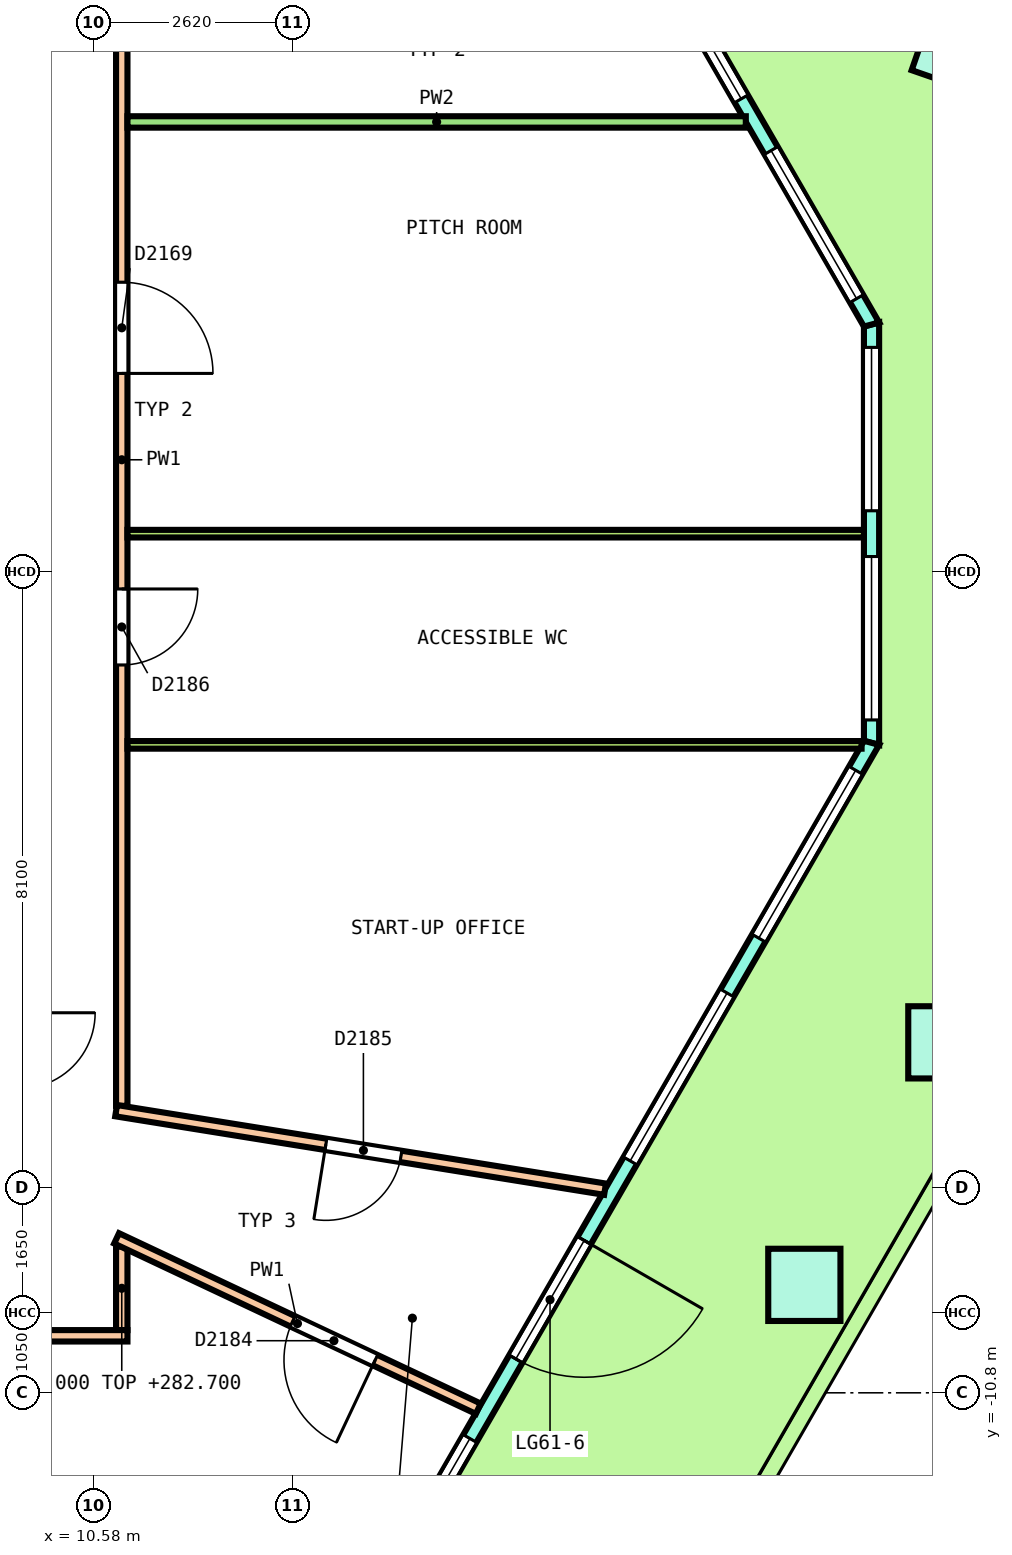
"""IFC4 building model, lengths in metres.
Left out: names, types, materials, properties, quantities, classifications, styles, units other than length and angle.
Written with IfcOpenShell. Run it as: python <this file> out.ifc"""

import sys

from ifc_helpers import new_model, si_unit, direction, frame, frame_2d, origin, origin_2d, place, context, subcontext, project, spatial, polyline, rectangle, outline, extrude, element, fill, save


model = new_model("IFC4")
c1 = context("Model", 3, precision=1e-05, world=origin(), true_north=direction((0.0, 1.0)))
c2 = subcontext(c1, "Body", "Model", "MODEL_VIEW")
j1 = project(units=[si_unit("LENGTHUNIT", "METRE"), si_unit("PLANEANGLEUNIT", "RADIAN")], contexts=[c1])
p1 = place(None, origin())
s1 = spatial("IfcSite", under=j1, at=p1, CompositionType="ELEMENT")
p2 = place(p1, origin())
s2 = spatial("IfcBuilding", under=s1, at=p2, CompositionType="ELEMENT")
p3 = place(p2, frame((0.0, 0.0, 279.0)))
s3 = spatial("IfcBuildingStorey", under=s2, at=p3, CompositionType="ELEMENT", Elevation=279.0)
p4 = place(p3, frame((21.946, 6.893, 0.0), z_axis=(0.021793949015, 0.025136579231, 0.999446434868), x_axis=(-0.499172624886, 0.866433923407, -0.010906279564)))
e1 = element("IfcColumn", 1, at=p4, inside=s3, PredefinedType="COLUMN", context=c2, shape_type="SweptSolid", body=[
    extrude(rectangle(XDim=0.95, YDim=0.95, at=origin_2d()), origin(), (0.0, 0.0, 1.0), 3.652),
])
p5 = place(p3, frame((19.93, -9.38, 0.0), z_axis=(0.003611945175, 0.00628746012, 0.999973710503), x_axis=(0.497890394796, 0.867209649664, -0.007251089524)))
e2 = element("IfcColumn", 2, at=p5, inside=s3, PredefinedType="COLUMN", context=c2, shape_type="SweptSolid", body=[
    extrude(rectangle(XDim=0.95, YDim=0.95, at=origin_2d()), origin(), (0.0, 0.0, 1.0), 3.65),
])
p6 = place(p3, frame((21.772, -6.189, 0.0), z_axis=(0.010900423214, 0.018858400897, 0.999762742599), x_axis=(0.500590318805, 0.865410234662, -0.021782067434)))
e3 = element("IfcColumn", 3, at=p6, inside=s3, PredefinedType="COLUMN", context=c2, shape_type="SweptSolid", body=[
    extrude(rectangle(XDim=0.95, YDim=0.95, at=origin_2d()), origin(), (0.0, 0.0, 1.0), 3.651),
])
p7 = place(p3, frame((20.814, -2.249, 0.0), z_axis=(0.0, 0.0, 1.0), x_axis=(0.0, 1.0, 0.0)))
e4 = element("IfcWall", 4, at=p7, inside=s3, PredefinedType="SOLIDWALL", context=c2, shape_type="SweptSolid", body=[
    extrude(outline(polyline([(-0.027, -0.1), (1.084, -0.1), (2.196, -0.1), (3.307, -0.1), (4.419, -0.1), (5.53, -0.1), (5.476, 0.1), (4.386, 0.1), (3.297, 0.1), (2.207, 0.1), (1.117, 0.1), (0.027, 0.1), (-0.027, -0.1)])), origin(), (0.0, 0.0, 1.0), 3.7),
])
p8 = place(p7, frame((0.301, 0.0, 0.1)))
e5 = element("IfcOpeningElement", 5, at=p8, cuts=e4, PredefinedType="OPENING", context=c2, shape_type="SweptSolid", body=[
    extrude(rectangle(XDim=2.15, YDim=2.75, at=frame_2d((1.075, 1.375))), frame((0.0, 0.11, 0.0), z_axis=(0.0, -1.0, 0.0), x_axis=(1.0, 0.0, 0.0)), (0.0, 0.0, 1.0), 0.22),
])
p9 = place(p7, frame((3.052, 0.0, 0.1)))
e6 = element("IfcOpeningElement", 6, at=p9, cuts=e4, PredefinedType="OPENING", context=c2, shape_type="SweptSolid", body=[
    extrude(rectangle(XDim=2.15, YDim=2.75, at=frame_2d((1.075, 1.375))), frame((0.0, 0.11, 0.0), z_axis=(0.0, -1.0, 0.0), x_axis=(1.0, 0.0, 0.0)), (0.0, 0.0, 1.0), 0.22),
])
p10 = place(p3, frame((20.814, 3.254, 0.0), z_axis=(0.0, 0.0, 1.0), x_axis=(-0.50000233518, 0.866024055563, 0.0)))
e7 = element("IfcWall", 7, at=p10, inside=s3, PredefinedType="SOLIDWALL", context=c2, shape_type="SweptSolid", body=[
    extrude(outline(polyline([(-0.027, -0.1), (0.989, -0.1), (2.004, -0.1), (3.019, -0.1), (4.035, -0.1), (5.05, -0.1), (6.065, -0.1), (7.081, -0.1), (8.096, -0.1), (9.112, -0.1), (10.127, -0.1), (11.143, -0.1), (12.158, -0.1), (13.173, -0.1), (14.189, -0.1), (15.204, -0.1), (15.15, 0.1), (14.142, 0.1), (13.134, 0.1), (12.126, 0.1), (11.117, 0.1), (10.109, 0.1), (9.101, 0.1), (8.093, 0.1), (7.084, 0.1), (6.076, 0.1), (5.068, 0.1), (4.06, 0.1), (3.052, 0.1), (2.043, 0.1), (1.035, 0.1), (0.027, 0.1), (-0.027, -0.1)])), origin(), (0.0, 0.0, 1.0), 3.7),
])
p11 = place(p10, frame((0.393, 0.0, 0.1)))
e8 = element("IfcOpeningElement", 8, at=p11, cuts=e7, PredefinedType="OPENING", context=c2, shape_type="SweptSolid", body=[
    extrude(rectangle(XDim=2.25, YDim=2.75, at=frame_2d((1.125, 1.375))), frame((0.0, 0.11, 0.0), z_axis=(0.0, -1.0, 0.0), x_axis=(1.0, 0.0, 0.0)), (0.0, 0.0, 1.0), 0.22),
])
p12 = place(p10, frame((3.428, 0.0, 0.1)))
e9 = element("IfcOpeningElement", 9, at=p12, cuts=e7, PredefinedType="OPENING", context=c2, shape_type="SweptSolid", body=[
    extrude(rectangle(XDim=2.25, YDim=2.75, at=frame_2d((1.125, 1.375))), frame((0.0, 0.11, 0.0), z_axis=(0.0, -1.0, 0.0), x_axis=(1.0, 0.0, 0.0)), (0.0, 0.0, 1.0), 0.22),
])
p13 = place(p10, frame((6.689, 0.0, 0.0)))
e10 = element("IfcOpeningElement", 10, at=p13, cuts=e7, PredefinedType="OPENING", context=c2, shape_type="SweptSolid", body=[
    extrude(rectangle(XDim=1.8, YDim=2.4, at=frame_2d((0.9, 1.2))), frame((0.0, 0.11, 0.0), z_axis=(0.0, -1.0, 0.0), x_axis=(1.0, 0.0, 0.0)), (0.0, 0.0, 1.0), 0.22),
])
p14 = place(p10, frame((6.689, 0.0, 2.55)))
e11 = element("IfcOpeningElement", 11, at=p14, cuts=e7, PredefinedType="OPENING", context=c2, shape_type="SweptSolid", body=[
    extrude(rectangle(XDim=1.8, YDim=0.3, at=frame_2d((0.9, 0.15))), frame((0.0, 0.11, 0.0), z_axis=(0.0, -1.0, 0.0), x_axis=(1.0, 0.0, 0.0)), (0.0, 0.0, 1.0), 0.22),
])
p15 = place(p10, frame((9.499, 0.0, 0.1)))
e12 = element("IfcOpeningElement", 12, at=p15, cuts=e7, PredefinedType="OPENING", context=c2, shape_type="SweptSolid", body=[
    extrude(rectangle(XDim=2.25, YDim=2.75, at=frame_2d((1.125, 1.375))), frame((0.0, 0.11, 0.0), z_axis=(0.0, -1.0, 0.0), x_axis=(1.0, 0.0, 0.0)), (0.0, 0.0, 1.0), 0.22),
])
p16 = place(p10, frame((12.534, 0.0, 0.1)))
e13 = element("IfcOpeningElement", 13, at=p16, cuts=e7, PredefinedType="OPENING", context=c2, shape_type="SweptSolid", body=[
    extrude(rectangle(XDim=2.25, YDim=2.75, at=frame_2d((1.125, 1.375))), frame((0.0, 0.11, 0.0), z_axis=(0.0, -1.0, 0.0), x_axis=(1.0, 0.0, 0.0)), (0.0, 0.0, 1.0), 0.22),
])
p17 = place(p3, frame((12.355, -16.901, 0.0), z_axis=(0.0, 0.0, 1.0), x_axis=(0.499997253739, 0.866026989333, 0.0)))
e14 = element("IfcWall", 14, at=p17, inside=s3, PredefinedType="SOLIDWALL", context=c2, shape_type="SweptSolid", body=[
    extrude(outline(polyline([(-0.027, -0.1), (1.034, -0.1), (2.095, -0.1), (3.156, -0.1), (4.216, -0.1), (5.277, -0.1), (6.338, -0.1), (7.399, -0.1), (8.459, -0.1), (9.52, -0.1), (10.581, -0.1), (11.642, -0.1), (12.703, -0.1), (13.763, -0.1), (14.824, -0.1), (15.885, -0.1), (16.946, -0.1), (16.892, 0.1), (15.838, 0.1), (14.784, 0.1), (13.73, 0.1), (12.676, 0.1), (11.622, 0.1), (10.568, 0.1), (9.514, 0.1), (8.459, 0.1), (7.405, 0.1), (6.351, 0.1), (5.297, 0.1), (4.243, 0.1), (3.189, 0.1), (2.135, 0.1), (1.081, 0.1), (0.027, 0.1), (-0.027, -0.1)])), origin(), (0.0, 0.0, 1.0), 3.7),
])
p18 = place(p17, frame((0.417, 0.0, 0.1)))
e15 = element("IfcOpeningElement", 15, at=p18, cuts=e14, PredefinedType="OPENING", context=c2, shape_type="SweptSolid", body=[
    extrude(rectangle(XDim=2.55, YDim=2.75, at=frame_2d((1.275, 1.375))), frame((0.0, 0.11, 0.0), z_axis=(0.0, -1.0, 0.0), x_axis=(1.0, 0.0, 0.0)), (0.0, 0.0, 1.0), 0.22),
])
p19 = place(p17, frame((3.801, 0.0, 0.1)))
e16 = element("IfcOpeningElement", 16, at=p19, cuts=e14, PredefinedType="OPENING", context=c2, shape_type="SweptSolid", body=[
    extrude(rectangle(XDim=2.55, YDim=2.75, at=frame_2d((1.275, 1.375))), frame((0.0, 0.11, 0.0), z_axis=(0.0, -1.0, 0.0), x_axis=(1.0, 0.0, 0.0)), (0.0, 0.0, 1.0), 0.22),
])
p20 = place(p17, frame((7.56, 0.0, 0.0)))
e17 = element("IfcOpeningElement", 17, at=p20, cuts=e14, PredefinedType="OPENING", context=c2, shape_type="SweptSolid", body=[
    extrude(rectangle(XDim=1.8, YDim=2.4, at=frame_2d((0.9, 1.2))), frame((0.0, 0.11, 0.0), z_axis=(0.0, -1.0, 0.0), x_axis=(1.0, 0.0, 0.0)), (0.0, 0.0, 1.0), 0.22),
])
p21 = place(p17, frame((7.56, 0.0, 2.55)))
e18 = element("IfcOpeningElement", 18, at=p21, cuts=e14, PredefinedType="OPENING", context=c2, shape_type="SweptSolid", body=[
    extrude(rectangle(XDim=1.8, YDim=0.3, at=frame_2d((0.9, 0.15))), frame((0.0, 0.11, 0.0), z_axis=(0.0, -1.0, 0.0), x_axis=(1.0, 0.0, 0.0)), (0.0, 0.0, 1.0), 0.22),
])
p22 = place(p17, frame((10.568, 0.0, 0.1)))
e19 = element("IfcOpeningElement", 19, at=p22, cuts=e14, PredefinedType="OPENING", context=c2, shape_type="SweptSolid", body=[
    extrude(rectangle(XDim=2.55, YDim=2.75, at=frame_2d((1.275, 1.375))), frame((0.0, 0.11, 0.0), z_axis=(0.0, -1.0, 0.0), x_axis=(1.0, 0.0, 0.0)), (0.0, 0.0, 1.0), 0.22),
])
p23 = place(p17, frame((13.952, 0.0, 0.1)))
e20 = element("IfcOpeningElement", 20, at=p23, cuts=e14, PredefinedType="OPENING", context=c2, shape_type="SweptSolid", body=[
    extrude(rectangle(XDim=2.55, YDim=2.75, at=frame_2d((1.275, 1.375))), frame((0.0, 0.11, 0.0), z_axis=(0.0, -1.0, 0.0), x_axis=(1.0, 0.0, 0.0)), (0.0, 0.0, 1.0), 0.22),
])
p24 = place(p3, frame((10.95, -9.975, 0.0), z_axis=(0.0, 0.0, 1.0), x_axis=(0.0, 1.0, 0.0)))
e21 = element("IfcWall", 21, at=p24, inside=s3, PredefinedType="PARTITIONING", context=c2, shape_type="SweptSolid", body=[
    extrude(rectangle(XDim=1.1, YDim=0.15, at=frame_2d((0.55, 0.0))), origin(), (0.0, 0.0, 1.0), 3.7),
])
p25 = place(p3, frame((10.95, -7.025, 0.0), z_axis=(0.0, 0.0, 1.0), x_axis=(0.0, 1.0, 0.0)))
e22 = element("IfcWall", 22, at=p25, inside=s3, PredefinedType="PARTITIONING", context=c2, shape_type="SweptSolid", body=[
    extrude(rectangle(XDim=17.0, YDim=0.15, at=frame_2d((8.5, 0.0))), origin(), (0.0, 0.0, 1.0), 2.9),
])
p26 = place(p25, frame((9.636, 0.0, 0.0)))
e23 = element("IfcOpeningElement", 23, at=p26, cuts=e22, PredefinedType="OPENING", context=c2, shape_type="SweptSolid", body=[
    extrude(rectangle(XDim=1.2, YDim=2.1, at=frame_2d((0.6, 1.05))), frame((0.0, 0.085, 0.0), z_axis=(0.0, -1.0, 0.0), x_axis=(1.0, 0.0, 0.0)), (0.0, 0.0, 1.0), 0.17),
])
p27 = place(p25, frame((14.51, 0.0, 0.0)))
e24 = element("IfcOpeningElement", 24, at=p27, cuts=e22, PredefinedType="OPENING", context=c2, shape_type="SweptSolid", body=[
    extrude(rectangle(XDim=1.0, YDim=2.1, at=frame_2d((0.5, 1.05))), frame((0.0, 0.085, 0.0), z_axis=(0.0, -1.0, 0.0), x_axis=(1.0, 0.0, 0.0)), (0.0, 0.0, 1.0), 0.17),
])
p28 = place(p25, frame((5.8, 0.0, 0.0)))
e25 = element("IfcOpeningElement", 25, at=p28, cuts=e22, PredefinedType="OPENING", context=c2, shape_type="SweptSolid", body=[
    extrude(rectangle(XDim=1.0, YDim=2.1, at=frame_2d((0.5, 1.05))), frame((0.0, 0.085, 0.0), z_axis=(0.0, -1.0, 0.0), x_axis=(1.0, 0.0, 0.0)), (0.0, 0.0, 1.0), 0.17),
])
p29 = place(p3, frame((-10.9, -10.05, 0.0), z_axis=(0.0, 0.0, 1.0), x_axis=(1.0, 0.0, 0.0)))
e26 = element("IfcWall", 26, at=p29, inside=s3, PredefinedType="PARTITIONING", context=c2, shape_type="SweptSolid", body=[
    extrude(rectangle(XDim=21.925, YDim=0.15, at=frame_2d((10.962, 0.0))), origin(), (0.0, 0.0, 1.0), 2.9),
])
p30 = place(p29, frame((2.54, 0.0, 0.0)))
e27 = element("IfcOpeningElement", 27, at=p30, cuts=e26, PredefinedType="OPENING", context=c2, shape_type="SweptSolid", body=[
    extrude(rectangle(XDim=1.2, YDim=2.1, at=frame_2d((0.6, 1.05))), frame((0.0, 0.085, 0.0), z_axis=(0.0, -1.0, 0.0), x_axis=(1.0, 0.0, 0.0)), (0.0, 0.0, 1.0), 0.17),
])
p31 = place(p29, frame((9.214, 0.0, 0.0)))
e28 = element("IfcOpeningElement", 28, at=p31, cuts=e26, PredefinedType="OPENING", context=c2, shape_type="SweptSolid", body=[
    extrude(rectangle(XDim=1.2, YDim=2.1, at=frame_2d((0.6, 1.05))), frame((0.0, 0.085, 0.0), z_axis=(0.0, -1.0, 0.0), x_axis=(1.0, 0.0, 0.0)), (0.0, 0.0, 1.0), 0.17),
])
p32 = place(p29, frame((16.694, 0.0, 0.0)))
e29 = element("IfcOpeningElement", 29, at=p32, cuts=e26, PredefinedType="OPENING", context=c2, shape_type="SweptSolid", body=[
    extrude(rectangle(XDim=1.0, YDim=2.1, at=frame_2d((0.5, 1.05))), frame((0.0, 0.085, 0.0), z_axis=(0.0, -1.0, 0.0), x_axis=(1.0, 0.0, 0.0)), (0.0, 0.0, 1.0), 0.17),
])
p33 = place(p3, frame((10.882, -8.768, 0.0), z_axis=(0.0, 0.0, 1.0), x_axis=(0.904688229147, -0.426074181386, 0.0)))
e30 = element("IfcWall", 30, at=p33, inside=s3, PredefinedType="PARTITIONING", context=c2, shape_type="SweptSolid", body=[
    extrude(rectangle(XDim=5.26, YDim=0.15, at=frame_2d((2.63, 0.0))), origin(), (0.0, 0.0, 1.0), 2.9),
])
p34 = place(p33, frame((2.56, 0.0, 0.0)))
e31 = element("IfcOpeningElement", 31, at=p34, cuts=e30, PredefinedType="OPENING", context=c2, shape_type="SweptSolid", body=[
    extrude(rectangle(XDim=1.2, YDim=2.1, at=frame_2d((0.6, 1.05))), frame((0.0, 0.085, 0.0), z_axis=(0.0, -1.0, 0.0), x_axis=(1.0, 0.0, 0.0)), (0.0, 0.0, 1.0), 0.17),
])
p35 = place(p3, frame((10.876, -7.088, 0.0), z_axis=(0.0, 0.0, 1.0), x_axis=(0.987349969018, -0.158556105777, 0.0)))
e32 = element("IfcWall", 32, at=p35, inside=s3, PredefinedType="PARTITIONING", context=c2, shape_type="SweptSolid", body=[
    extrude(rectangle(XDim=6.515, YDim=0.15, at=frame_2d((3.257, 0.0))), origin(), (0.0, 0.0, 1.0), 2.9),
])
p36 = place(p35, frame((2.795, 0.0, 0.0)))
e33 = element("IfcOpeningElement", 33, at=p36, cuts=e32, PredefinedType="OPENING", context=c2, shape_type="SweptSolid", body=[
    extrude(rectangle(XDim=1.0, YDim=2.1, at=frame_2d((0.5, 1.05))), frame((0.0, 0.085, 0.0), z_axis=(0.0, -1.0, 0.0), x_axis=(1.0, 0.0, 0.0)), (0.0, 0.0, 1.0), 0.17),
])
p37 = place(p3, frame((11.025, 5.919, 0.0), z_axis=(0.0, 0.0, 1.0), x_axis=(1.0, 0.0, 0.0)))
e34 = element("IfcWall", 34, at=p37, inside=s3, PredefinedType="PARTITIONING", context=c2, shape_type="SweptSolid", body=[
    extrude(rectangle(XDim=8.135, YDim=0.15, at=frame_2d((4.068, 0.0))), origin(), (0.0, 0.0, 1.0), 2.9),
])
p38 = place(p3, frame((11.025, 0.503, 0.0), z_axis=(0.0, 0.0, 1.0), x_axis=(1.0, 0.0, 0.0)))
e35 = element("IfcWall", 35, at=p38, inside=s3, PredefinedType="PARTITIONING", context=c2, shape_type="SweptSolid", body=[
    extrude(rectangle(XDim=9.689, YDim=0.1, at=frame_2d((4.845, 0.0))), origin(), (0.0, 0.0, 1.0), 2.9),
])
p39 = place(p3, frame((11.025, -2.276, 0.0), z_axis=(0.0, 0.0, 1.0), x_axis=(1.0, 0.0, 0.0)))
e36 = element("IfcWall", 36, at=p39, inside=s3, PredefinedType="PARTITIONING", context=c2, shape_type="SweptSolid", body=[
    extrude(rectangle(XDim=9.658, YDim=0.1, at=frame_2d((4.829, 0.0))), origin(), (0.0, 0.0, 1.0), 2.9),
])
p40 = place(p8, origin())
e37 = element("IfcWindow", 37, at=p40, inside=s3, PartitioningType="SINGLE_PANEL", PredefinedType="WINDOW", context=c2, shape_type="SweptSolid", body=[
    extrude(rectangle(XDim=2.15, YDim=2.75, at=frame_2d((1.075, 1.375))), frame((0.0, 0.03, 0.0), z_axis=(0.0, -1.0, 0.0), x_axis=(1.0, 0.0, 0.0)), (0.0, 0.0, 1.0), 0.06),
])
fill(e5, e37)
p41 = place(p9, origin())
e38 = element("IfcWindow", 38, at=p41, inside=s3, PartitioningType="SINGLE_PANEL", PredefinedType="WINDOW", context=c2, shape_type="SweptSolid", body=[
    extrude(rectangle(XDim=2.15, YDim=2.75, at=frame_2d((1.075, 1.375))), frame((0.0, 0.03, 0.0), z_axis=(0.0, -1.0, 0.0), x_axis=(1.0, 0.0, 0.0)), (0.0, 0.0, 1.0), 0.06),
])
fill(e6, e38)
p42 = place(p11, origin())
e39 = element("IfcWindow", 39, at=p42, inside=s3, PartitioningType="SINGLE_PANEL", PredefinedType="WINDOW", context=c2, shape_type="SweptSolid", body=[
    extrude(rectangle(XDim=2.25, YDim=2.75, at=frame_2d((1.125, 1.375))), frame((0.0, 0.03, 0.0), z_axis=(0.0, -1.0, 0.0), x_axis=(1.0, 0.0, 0.0)), (0.0, 0.0, 1.0), 0.06),
])
fill(e8, e39)
p43 = place(p12, origin())
e40 = element("IfcWindow", 40, at=p43, inside=s3, PartitioningType="SINGLE_PANEL", PredefinedType="WINDOW", context=c2, shape_type="SweptSolid", body=[
    extrude(rectangle(XDim=2.25, YDim=2.75, at=frame_2d((1.125, 1.375))), frame((0.0, 0.03, 0.0), z_axis=(0.0, -1.0, 0.0), x_axis=(1.0, 0.0, 0.0)), (0.0, 0.0, 1.0), 0.06),
])
fill(e9, e40)
p44 = place(p19, origin())
e41 = element("IfcWindow", 41, at=p44, inside=s3, PartitioningType="SINGLE_PANEL", PredefinedType="WINDOW", context=c2, shape_type="SweptSolid", body=[
    extrude(rectangle(XDim=2.55, YDim=2.75, at=frame_2d((1.275, 1.375))), frame((0.0, 0.03, 0.0), z_axis=(0.0, -1.0, 0.0), x_axis=(1.0, 0.0, 0.0)), (0.0, 0.0, 1.0), 0.06),
])
fill(e16, e41)
p45 = place(p20, origin())
e42 = element("IfcDoor", 42, at=p45, inside=s3, OperationType="DOUBLE_DOOR_SINGLE_SWING", PredefinedType="DOOR", context=c2, shape_type="SweptSolid", body=[
    extrude(rectangle(XDim=1.8, YDim=2.4, at=frame_2d((0.9, 1.2))), frame((0.0, 0.025, 0.0), z_axis=(0.0, -1.0, 0.0), x_axis=(1.0, 0.0, 0.0)), (0.0, 0.0, 1.0), 0.05),
])
fill(e17, e42)
p46 = place(p21, origin())
e43 = element("IfcWindow", 43, at=p46, inside=s3, PartitioningType="SINGLE_PANEL", PredefinedType="WINDOW", context=c2, shape_type="SweptSolid", body=[
    extrude(rectangle(XDim=1.8, YDim=0.3, at=frame_2d((0.9, 0.15))), frame((0.0, 0.03, 0.0), z_axis=(0.0, -1.0, 0.0), x_axis=(1.0, 0.0, 0.0)), (0.0, 0.0, 1.0), 0.06),
])
fill(e18, e43)
p47 = place(p22, origin())
e44 = element("IfcWindow", 44, at=p47, inside=s3, PartitioningType="SINGLE_PANEL", PredefinedType="WINDOW", context=c2, shape_type="SweptSolid", body=[
    extrude(rectangle(XDim=2.55, YDim=2.75, at=frame_2d((1.275, 1.375))), frame((0.0, 0.03, 0.0), z_axis=(0.0, -1.0, 0.0), x_axis=(1.0, 0.0, 0.0)), (0.0, 0.0, 1.0), 0.06),
])
fill(e19, e44)
p48 = place(p23, origin())
e45 = element("IfcWindow", 45, at=p48, inside=s3, PartitioningType="SINGLE_PANEL", PredefinedType="WINDOW", context=c2, shape_type="SweptSolid", body=[
    extrude(rectangle(XDim=2.55, YDim=2.75, at=frame_2d((1.275, 1.375))), frame((0.0, 0.03, 0.0), z_axis=(0.0, -1.0, 0.0), x_axis=(1.0, 0.0, 0.0)), (0.0, 0.0, 1.0), 0.06),
])
fill(e20, e45)
p49 = place(p26, origin())
e46 = element("IfcDoor", 46, at=p49, inside=s3, OperationType="DOUBLE_DOOR_SINGLE_SWING", PredefinedType="DOOR", context=c2, shape_type="SweptSolid", body=[
    extrude(rectangle(XDim=1.2, YDim=2.1, at=frame_2d((0.6, 1.05))), frame((0.0, 0.025, 0.0), z_axis=(0.0, -1.0, 0.0), x_axis=(1.0, 0.0, 0.0)), (0.0, 0.0, 1.0), 0.05),
])
fill(e23, e46)
p50 = place(p34, origin())
e47 = element("IfcDoor", 47, at=p50, inside=s3, OperationType="DOUBLE_DOOR_SINGLE_SWING", PredefinedType="DOOR", context=c2, shape_type="SweptSolid", body=[
    extrude(rectangle(XDim=1.2, YDim=2.1, at=frame_2d((0.6, 1.05))), frame((0.0, 0.025, 0.0), z_axis=(0.0, -1.0, 0.0), x_axis=(1.0, 0.0, 0.0)), (0.0, 0.0, 1.0), 0.05),
])
fill(e31, e47)
p51 = place(p36, origin())
e48 = element("IfcDoor", 48, at=p51, inside=s3, OperationType="SINGLE_SWING_LEFT", PredefinedType="DOOR", context=c2, shape_type="SweptSolid", body=[
    extrude(rectangle(XDim=1.0, YDim=2.1, at=frame_2d((0.5, 1.05))), frame((0.0, 0.025, 0.0), z_axis=(0.0, -1.0, 0.0), x_axis=(1.0, 0.0, 0.0)), (0.0, 0.0, 1.0), 0.05),
])
fill(e33, e48)
p52 = place(p28, origin())
e49 = element("IfcDoor", 49, at=p52, inside=s3, OperationType="SINGLE_SWING_RIGHT", PredefinedType="DOOR", context=c2, shape_type="SweptSolid", body=[
    extrude(rectangle(XDim=1.0, YDim=2.1, at=frame_2d((0.5, 1.05))), frame((0.0, 0.025, 0.0), z_axis=(0.0, -1.0, 0.0), x_axis=(1.0, 0.0, 0.0)), (0.0, 0.0, 1.0), 0.05),
])
fill(e25, e49)
save(model, sys.argv[1])
